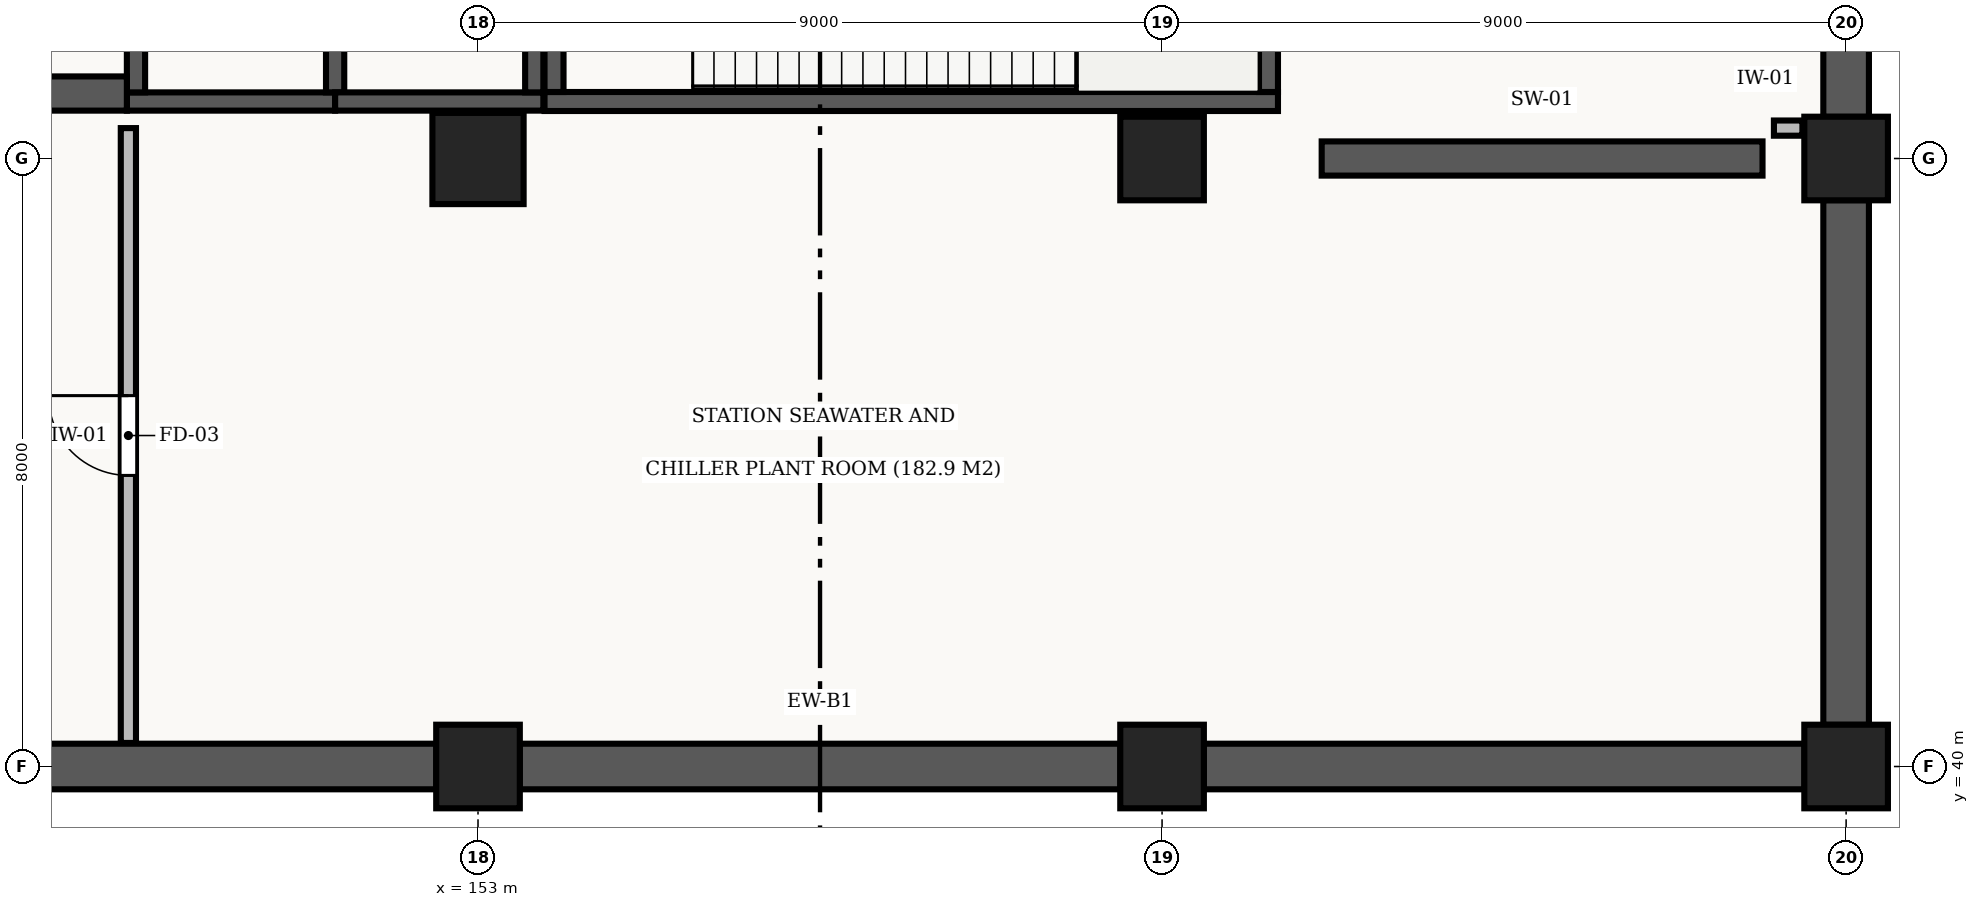
"""IFC4 building model, lengths in metres.
Left out: names, types, materials, properties, quantities, classifications, styles, units other than length and angle.
Written with IfcOpenShell. Run it as: python <this file> out.ifc"""

import sys

from ifc_helpers import new_model, si_unit, direction, frame, frame_2d, origin, origin_2d, place, context, subcontext, project, spatial, rectangle, extrude, element, fill, save


model = new_model("IFC4")
c1 = context("Model", 3, precision=1e-05, world=origin(), true_north=direction((0.0, 1.0)))
c2 = subcontext(c1, "Body", "Model", "MODEL_VIEW")
j1 = project(units=[si_unit("LENGTHUNIT", "METRE"), si_unit("PLANEANGLEUNIT", "RADIAN")], contexts=[c1])
p1 = place(None, origin())
s1 = spatial("IfcSite", under=j1, at=p1, CompositionType="ELEMENT")
p2 = place(p1, origin())
s2 = spatial("IfcBuilding", under=s1, at=p2, CompositionType="ELEMENT")
p3 = place(p2, frame((0.0, 0.0, -12.0)))
s3 = spatial("IfcBuildingStorey", under=s2, at=p3, CompositionType="ELEMENT", Elevation=-12.0)
p4 = place(p3, frame((153.0, 40.0, 0.0), z_axis=(0.0, 0.0, 1.0), x_axis=(1.0, 0.0, 0.0)))
e1 = element("IfcColumn", 1, at=p4, inside=s3, PredefinedType="COLUMN", context=c2, shape_type="SweptSolid", body=[
    extrude(rectangle(XDim=1.1, YDim=1.1, at=origin_2d()), origin(), (0.0, 0.0, 1.0), 6.0),
])
p5 = place(p3, frame((153.0, 48.0, 0.0), z_axis=(0.0, 0.0, 1.0), x_axis=(1.0, 0.0, 0.0)))
e2 = element("IfcColumn", 2, at=p5, inside=s3, PredefinedType="COLUMN", context=c2, shape_type="SweptSolid", body=[
    extrude(rectangle(XDim=1.2, YDim=1.2, at=origin_2d()), origin(), (0.0, 0.0, 1.0), 6.0),
])
for number, where, z_axis, x_axis in (
    (3, (162.0, 40.0, 0.0), (0.0, 0.0, 1.0), (1.0, 0.0, 0.0)),
    (4, (162.0, 48.0, 0.0), (0.0, 0.0, 1.0), (1.0, 0.0, 0.0)),
    (5, (171.0, 40.0, 0.0), (0.0, 0.0, 1.0), (1.0, 0.0, 0.0)),
    (6, (171.0, 48.0, 0.0), (0.0, 0.0, 1.0), (1.0, 0.0, 0.0)),
):
    element("IfcColumn", number, at=place(p3, frame(where, z_axis=z_axis, x_axis=x_axis)), inside=s3, PredefinedType="COLUMN", context=c2, shape_type="SweptSolid", body=[
        extrude(rectangle(XDim=1.1, YDim=1.1, at=origin_2d()), origin(), (0.0, 0.0, 1.0), 6.0),
    ])
for number, where, z_axis, x_axis in (
    (7, (171.0, 55.452, 0.0), (0.0, 0.0, 1.0), (0.0, -1.0, 0.0)),
    (8, (171.0, 47.452, 0.0), (0.0, 0.0, 1.0), (0.0, -1.0, 0.0)),
):
    element("IfcWall", number, at=place(p3, frame(where, z_axis=z_axis, x_axis=x_axis)), inside=s3, PredefinedType="STANDARD", context=c2, shape_type="SweptSolid", body=[
        extrude(rectangle(XDim=6.904, YDim=0.6, at=frame_2d((3.452, 0.0))), origin(), (0.0, 0.0, 1.0), 5.54),
    ])
for number, where, z_axis, x_axis in (
    (9, (170.452, 40.0, 0.0), (0.0, 0.0, 1.0), (-1.0, 0.0, 0.0)),
    (10, (161.452, 40.0, 0.0), (0.0, 0.0, 1.0), (-1.0, 0.0, 0.0)),
    (11, (152.452, 40.0, 0.0), (0.0, 0.0, 1.0), (-1.0, 0.0, 0.0)),
):
    element("IfcWall", number, at=place(p3, frame(where, z_axis=z_axis, x_axis=x_axis)), inside=s3, PredefinedType="STANDARD", context=c2, shape_type="SweptSolid", body=[
        extrude(rectangle(XDim=7.904, YDim=0.6, at=frame_2d((3.952, 0.0))), origin(), (0.0, 0.0, 1.0), 5.54),
    ])
p6 = place(p3, frame((153.875, 48.75, 0.0), z_axis=(0.0, 0.0, 1.0), x_axis=(1.0, 0.0, 0.0)))
e12 = element("IfcWall", 12, at=p6, inside=s3, PredefinedType="SHEAR", context=c2, shape_type="SweptSolid", body=[
    extrude(rectangle(XDim=9.65, YDim=0.25, at=frame_2d((4.825, 0.0))), origin(), (0.0, 0.0, 1.0), 5.53),
])
for number, where, z_axis, x_axis in (
    (13, (154.0, 52.725, 0.0), (0.0, 0.0, 1.0), (0.0, -1.0, 0.0)),
    (14, (163.4, 48.875, 0.0), (0.0, 0.0, 1.0), (0.0, 1.0, 0.0)),
):
    element("IfcWall", number, at=place(p3, frame(where, z_axis=z_axis, x_axis=x_axis)), inside=s3, PredefinedType="SHEAR", context=c2, shape_type="SweptSolid", body=[
        extrude(rectangle(XDim=3.85, YDim=0.25, at=frame_2d((1.925, 0.0))), origin(), (0.0, 0.0, 1.0), 5.53),
    ])
p7 = place(p3, frame((148.38, 48.75, 0.0), z_axis=(0.0, 0.0, 1.0), x_axis=(1.0, 0.0, 0.0)))
e15 = element("IfcWall", 15, at=p7, inside=s3, PredefinedType="SHEAR", context=c2, shape_type="SweptSolid", body=[
    extrude(rectangle(XDim=2.74, YDim=0.24, at=frame_2d((1.37, 0.0))), origin(), (0.0, 0.0, 1.0), 5.53),
])
for number, where, z_axis, x_axis in (
    (16, (148.5, 52.73, 0.0), (0.0, 0.0, 1.0), (0.0, -1.0, 0.0)),
    (17, (151.12, 48.87, 0.0), (0.0, 0.0, 1.0), (0.0, 1.0, 0.0)),
):
    element("IfcWall", number, at=place(p3, frame(where, z_axis=z_axis, x_axis=x_axis)), inside=s3, PredefinedType="SHEAR", context=c2, shape_type="SweptSolid", body=[
        extrude(rectangle(XDim=3.86, YDim=0.24, at=frame_2d((1.93, 0.0))), origin(), (0.0, 0.0, 1.0), 5.53),
    ])
p8 = place(p3, frame((151.12, 48.75, 0.0), z_axis=(0.0, 0.0, 1.0), x_axis=(1.0, 0.0, 0.0)))
e18 = element("IfcWall", 18, at=p8, inside=s3, PredefinedType="SHEAR", context=c2, shape_type="SweptSolid", body=[
    extrude(rectangle(XDim=2.74, YDim=0.24, at=frame_2d((1.37, 0.0))), origin(), (0.0, 0.0, 1.0), 5.53),
])
p9 = place(p3, frame((153.74, 48.87, 0.0), z_axis=(0.0, 0.0, 1.0), x_axis=(0.0, 1.0, 0.0)))
e19 = element("IfcWall", 19, at=p9, inside=s3, PredefinedType="SHEAR", context=c2, shape_type="SweptSolid", body=[
    extrude(rectangle(XDim=3.86, YDim=0.24, at=frame_2d((1.93, 0.0))), origin(), (0.0, 0.0, 1.0), 5.53),
])
p10 = place(p3, frame((145.68, 48.855, 0.0), z_axis=(0.0, 0.0, 1.0), x_axis=(1.0, 0.0, 0.0)))
e20 = element("IfcWall", 20, at=p10, inside=s3, PredefinedType="SHEAR", context=c2, shape_type="SweptSolid", body=[
    extrude(rectangle(XDim=2.7, YDim=0.45, at=frame_2d((1.35, 0.0))), origin(), (0.0, 0.0, 1.0), 4.58),
])
p11 = place(p3, frame((164.1, 48.0, 0.0), z_axis=(0.0, 0.0, 1.0), x_axis=(1.0, 0.0, 0.0)))
e21 = element("IfcWall", 21, at=p11, inside=s3, PredefinedType="SHEAR", context=c2, shape_type="SweptSolid", body=[
    extrude(rectangle(XDim=5.8, YDim=0.45, at=frame_2d((2.9, 0.0))), origin(), (0.0, 0.0, 1.0), 4.58),
])
p12 = place(p3, frame((170.05, 48.4, 0.0), z_axis=(0.0, 0.0, 1.0), x_axis=(1.0, 0.0, 0.0)))
e22 = element("IfcWall", 22, at=p12, inside=s3, PredefinedType="STANDARD", context=c2, shape_type="SweptSolid", body=[
    extrude(rectangle(XDim=0.375, YDim=0.2, at=frame_2d((0.188, 0.0))), origin(), (0.0, 0.0, 1.0), 5.53),
])
p13 = place(p3, frame((148.4, 40.31, 0.0), z_axis=(0.0, 0.0, 1.0), x_axis=(0.0, 1.0, 0.0)))
e23 = element("IfcWall", 23, at=p13, inside=s3, PredefinedType="STANDARD", context=c2, shape_type="SweptSolid", body=[
    extrude(rectangle(XDim=8.09, YDim=0.2, at=frame_2d((4.045, 0.0))), origin(), (0.0, 0.0, 1.0), 5.53),
])
p14 = place(p13, frame((3.52, 0.0, 0.0)))
e24 = element("IfcOpeningElement", 24, at=p14, cuts=e23, PredefinedType="OPENING", context=c2, shape_type="SweptSolid", body=[
    extrude(rectangle(XDim=1.05, YDim=2.15, at=frame_2d((0.525, 1.075))), frame((0.0, 0.112, 0.0), z_axis=(0.0, -1.0, 0.0), x_axis=(1.0, 0.0, 0.0)), (0.0, 0.0, 1.0), 0.224),
])
p15 = place(p14, origin())
e25 = element("IfcDoor", 25, at=p15, inside=s3, OperationType="SINGLE_SWING_RIGHT", PredefinedType="DOOR", context=c2, shape_type="SweptSolid", body=[
    extrude(rectangle(XDim=1.05, YDim=2.15, at=frame_2d((0.525, 1.075))), frame((0.0, 0.025, 0.0), z_axis=(0.0, -1.0, 0.0), x_axis=(1.0, 0.0, 0.0)), (0.0, 0.0, 1.0), 0.05),
])
fill(e24, e25)
save(model, sys.argv[1])
